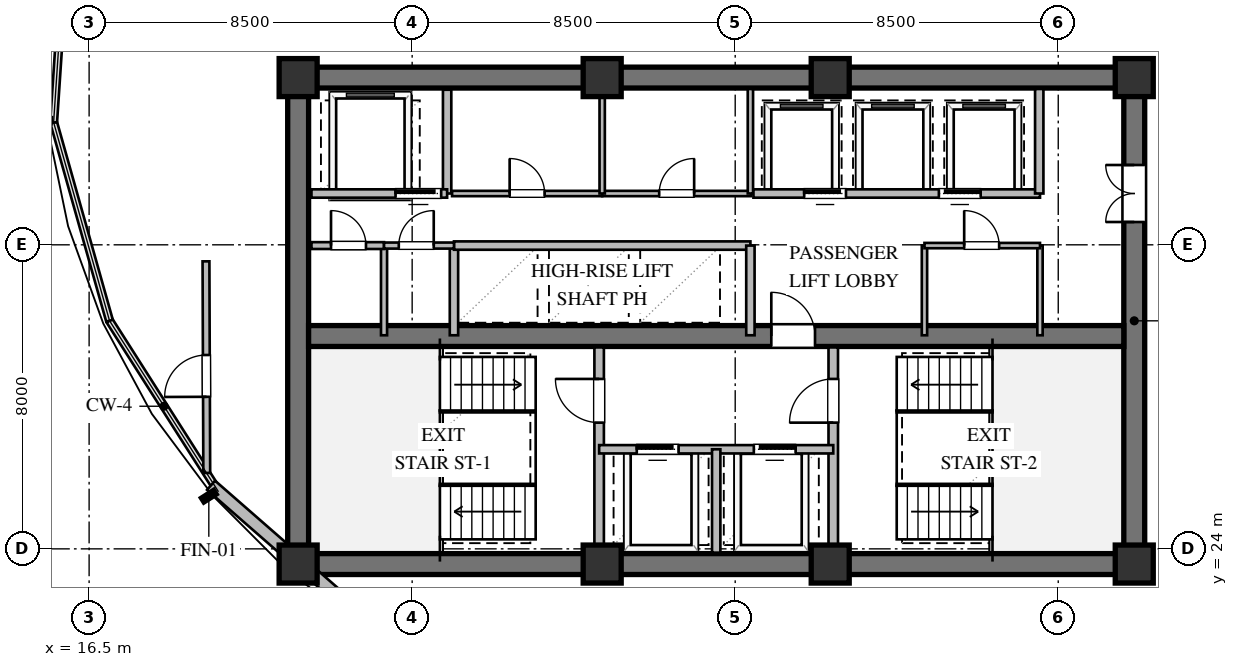
"""IFC4 building model, lengths in metres.
Left out: names, types, materials, properties, quantities, classifications, styles, units other than length and angle.
Written with IfcOpenShell. Run it as: python <this file> out.ifc"""

import sys

from ifc_helpers import new_model, si_unit, direction, frame, frame_2d, origin, origin_2d, place, context, subcontext, project, spatial, rectangle, extrude, element, fill, save


model = new_model("IFC4")
c1 = context("Model", 3, precision=1e-05, world=origin(), true_north=direction((0.0, 1.0)))
c2 = subcontext(c1, "Body", "Model", "MODEL_VIEW")
j1 = project(units=[si_unit("LENGTHUNIT", "METRE"), si_unit("PLANEANGLEUNIT", "RADIAN")], contexts=[c1])
p1 = place(None, origin())
s1 = spatial("IfcSite", under=j1, at=p1, CompositionType="ELEMENT")
p2 = place(p1, origin())
s2 = spatial("IfcBuilding", under=s1, at=p2, CompositionType="ELEMENT")
p3 = place(p2, frame((0.0, 0.0, 127.8)))
s3 = spatial("IfcBuildingStorey", under=s2, at=p3, CompositionType="ELEMENT", Elevation=127.8)
for number, where, z_axis, x_axis in (
    (1, (21.725, 23.6, 0.0), (0.0, 0.0, 1.0), (1.0, 0.0, 0.0)),
    (2, (21.725, 36.4, 0.0), (0.0, 0.0, 1.0), (1.0, 0.0, 0.0)),
):
    element("IfcWall", number, at=place(p3, frame(where, z_axis=z_axis, x_axis=x_axis)), inside=s3, PredefinedType="SHEAR", context=c2, shape_type="SweptSolid", body=[
        extrude(rectangle(XDim=22.55, YDim=0.55, at=frame_2d((11.275, 0.0))), origin(), (0.0, 0.0, 1.0), 3.36),
    ])
p4 = place(p3, frame((22.0, 23.875, 0.0), z_axis=(0.0, 0.0, 1.0), x_axis=(0.0, 1.0, 0.0)))
e3 = element("IfcWall", 3, at=p4, inside=s3, PredefinedType="SHEAR", context=c2, shape_type="SweptSolid", body=[
    extrude(rectangle(XDim=12.25, YDim=0.55, at=frame_2d((6.125, 0.0))), origin(), (0.0, 0.0, 1.0), 3.36),
])
p5 = place(p3, frame((44.0, 23.875, 0.0), z_axis=(0.0, 0.0, 1.0), x_axis=(0.0, 1.0, 0.0)))
e4 = element("IfcWall", 4, at=p5, inside=s3, PredefinedType="SHEAR", context=c2, shape_type="SweptSolid", body=[
    extrude(rectangle(XDim=12.25, YDim=0.55, at=frame_2d((6.125, 0.0))), origin(), (0.0, 0.0, 1.0), 3.36),
])
p6 = place(p5, frame((8.725, 0.0, 0.0)))
e5 = element("IfcOpeningElement", 5, at=p6, cuts=e4, PredefinedType="OPENING", context=c2, shape_type="SweptSolid", body=[
    extrude(rectangle(XDim=1.5, YDim=2.15, at=frame_2d((0.75, 1.075))), frame((0.0, 0.285, 0.0), z_axis=(0.0, -1.0, 0.0), x_axis=(1.0, 0.0, 0.0)), (0.0, 0.0, 1.0), 0.57),
])
p7 = place(p3, frame((22.275, 29.6, 0.0), z_axis=(0.0, 0.0, 1.0), x_axis=(1.0, 0.0, 0.0)))
e6 = element("IfcWall", 6, at=p7, inside=s3, PredefinedType="SHEAR", context=c2, shape_type="SweptSolid", body=[
    extrude(rectangle(XDim=21.45, YDim=0.55, at=frame_2d((10.725, 0.0))), origin(), (0.0, 0.0, 1.0), 3.36),
])
p8 = place(p7, frame((12.175, 0.0, 0.0)))
e7 = element("IfcOpeningElement", 7, at=p8, cuts=e6, PredefinedType="OPENING", context=c2, shape_type="SweptSolid", body=[
    extrude(rectangle(XDim=1.15, YDim=2.1, at=frame_2d((0.575, 1.05))), frame((0.0, 0.285, 0.0), z_axis=(0.0, -1.0, 0.0), x_axis=(1.0, 0.0, 0.0)), (0.0, 0.0, 1.0), 0.57),
])
for number, where, z_axis, x_axis in (
    (8, (22.0, 23.6, 0.0), (0.0, 0.0, 1.0), (1.0, 0.0, 0.0)),
    (9, (30.0, 23.6, 0.0), (0.0, 0.0, 1.0), (1.0, 0.0, 0.0)),
    (10, (36.0, 23.6, 0.0), (0.0, 0.0, 1.0), (1.0, 0.0, 0.0)),
    (11, (44.0, 23.6, 0.0), (0.0, 0.0, 1.0), (1.0, 0.0, 0.0)),
    (12, (44.0, 36.4, 0.0), (0.0, 0.0, 1.0), (1.0, 0.0, 0.0)),
    (13, (36.0, 36.4, 0.0), (0.0, 0.0, 1.0), (1.0, 0.0, 0.0)),
    (14, (30.0, 36.4, 0.0), (0.0, 0.0, 1.0), (1.0, 0.0, 0.0)),
    (15, (22.0, 36.4, 0.0), (0.0, 0.0, 1.0), (1.0, 0.0, 0.0)),
):
    element("IfcColumn", number, at=place(p3, frame(where, z_axis=z_axis, x_axis=x_axis)), inside=s3, PredefinedType="COLUMN", context=c2, shape_type="SweptSolid", body=[
        extrude(rectangle(XDim=1.0, YDim=1.0, at=origin_2d()), origin(), (0.0, 0.0, 1.0), 3.6),
    ])
p9 = place(p3, frame((24.225, 21.727, 0.0), z_axis=(0.0, 0.0, 1.0), x_axis=(-0.753105964003, 0.657899237713, 0.0)))
e16 = element("IfcWall", 16, at=p9, inside=s3, PredefinedType="STANDARD", context=c2, shape_type="SweptSolid", body=[
    extrude(rectangle(XDim=5.998, YDim=0.32, at=frame_2d((2.999, 0.0))), origin(), (0.0, 0.0, 1.0), 2.35),
])
p10 = place(p3, frame((29.92, 23.9, 0.0), z_axis=(0.0, 0.0, 1.0), x_axis=(0.0, 1.0, 0.0)))
e17 = element("IfcWall", 17, at=p10, inside=s3, PredefinedType="SOLIDWALL", context=c2, shape_type="SweptSolid", body=[
    extrude(rectangle(XDim=5.4, YDim=0.25, at=frame_2d((2.7, 0.0))), origin(), (0.0, 0.0, 1.0), 2.89),
])
p11 = place(p10, frame((3.421, 0.0, 0.0)))
e18 = element("IfcOpeningElement", 18, at=p11, cuts=e17, PredefinedType="OPENING", context=c2, shape_type="SweptSolid", body=[
    extrude(rectangle(XDim=1.15, YDim=2.1, at=frame_2d((0.575, 1.05))), frame((0.0, 0.135, 0.0), z_axis=(0.0, -1.0, 0.0), x_axis=(1.0, 0.0, 0.0)), (0.0, 0.0, 1.0), 0.27),
])
p12 = place(p3, frame((36.08, 23.9, 0.0), z_axis=(0.0, 0.0, 1.0), x_axis=(0.0, 1.0, 0.0)))
e19 = element("IfcWall", 19, at=p12, inside=s3, PredefinedType="SOLIDWALL", context=c2, shape_type="SweptSolid", body=[
    extrude(rectangle(XDim=5.4, YDim=0.25, at=frame_2d((2.7, 0.0))), origin(), (0.0, 0.0, 1.0), 3.36),
])
p13 = place(p12, frame((3.421, 0.0, 0.0)))
e20 = element("IfcOpeningElement", 20, at=p13, cuts=e19, PredefinedType="OPENING", context=c2, shape_type="SweptSolid", body=[
    extrude(rectangle(XDim=1.15, YDim=2.1, at=frame_2d((0.575, 1.05))), frame((0.0, 0.135, 0.0), z_axis=(0.0, -1.0, 0.0), x_axis=(1.0, 0.0, 0.0)), (0.0, 0.0, 1.0), 0.27),
])
p14 = place(p3, frame((29.92, 26.62, 0.0), z_axis=(0.0, 0.0, 1.0), x_axis=(1.0, 0.0, 0.0)))
e21 = element("IfcWall", 21, at=p14, inside=s3, PredefinedType="SOLIDWALL", context=c2, shape_type="SweptSolid", body=[
    extrude(rectangle(XDim=6.16, YDim=0.22, at=frame_2d((3.08, 0.0))), origin(), (0.0, 0.0, 1.0), 3.36),
])
p15 = place(p14, frame((0.99, 0.0, 0.0)))
e22 = element("IfcOpeningElement", 22, at=p15, cuts=e21, PredefinedType="OPENING", context=c2, shape_type="SweptSolid", body=[
    extrude(rectangle(XDim=1.1, YDim=2.1, at=frame_2d((0.55, 1.05))), frame((0.0, 0.12, 0.0), z_axis=(0.0, -1.0, 0.0), x_axis=(1.0, 0.0, 0.0)), (0.0, 0.0, 1.0), 0.24),
])
p16 = place(p14, frame((4.07, 0.0, 0.0)))
e23 = element("IfcOpeningElement", 23, at=p16, cuts=e21, PredefinedType="OPENING", context=c2, shape_type="SweptSolid", body=[
    extrude(rectangle(XDim=1.1, YDim=2.1, at=frame_2d((0.55, 1.05))), frame((0.0, 0.12, 0.0), z_axis=(0.0, -1.0, 0.0), x_axis=(1.0, 0.0, 0.0)), (0.0, 0.0, 1.0), 0.24),
])
p17 = place(p3, frame((33.0, 23.9, 0.0), z_axis=(0.0, 0.0, 1.0), x_axis=(0.0, 1.0, 0.0)))
e24 = element("IfcWall", 24, at=p17, inside=s3, PredefinedType="SOLIDWALL", context=c2, shape_type="SweptSolid", body=[
    extrude(rectangle(XDim=2.72, YDim=0.22, at=frame_2d((1.36, 0.0))), origin(), (0.0, 0.0, 1.0), 3.36),
])
p18 = place(p3, frame((25.92, 33.35, 0.0), z_axis=(0.0, 0.0, 1.0), x_axis=(0.0, 1.0, 0.0)))
e25 = element("IfcWall", 25, at=p18, inside=s3, PredefinedType="SOLIDWALL", context=c2, shape_type="SweptSolid", body=[
    extrude(rectangle(XDim=2.73, YDim=0.22, at=frame_2d((1.365, 0.0))), origin(), (0.0, 0.0, 1.0), 3.36),
])
p19 = place(p3, frame((22.35, 33.35, 0.0), z_axis=(0.0, 0.0, 1.0), x_axis=(1.0, 0.0, 0.0)))
e26 = element("IfcWall", 26, at=p19, inside=s3, PredefinedType="SOLIDWALL", context=c2, shape_type="SweptSolid", body=[
    extrude(rectangle(XDim=3.57, YDim=0.22, at=frame_2d((1.785, 0.0))), origin(), (0.0, 0.0, 1.0), 3.36),
])
p20 = place(p19, frame((2.213, 0.0, 0.0)))
e27 = element("IfcOpeningElement", 27, at=p20, cuts=e26, PredefinedType="OPENING", context=c2, shape_type="SweptSolid", body=[
    extrude(rectangle(XDim=1.2, YDim=2.1, at=frame_2d((0.6, 1.05))), frame((0.0, 0.12, 0.0), z_axis=(0.0, -1.0, 0.0), x_axis=(1.0, 0.0, 0.0)), (0.0, 0.0, 1.0), 0.24),
])
p21 = place(p3, frame((26.1, 29.62, 0.0), z_axis=(0.0, 0.0, 1.0), x_axis=(0.0, 1.0, 0.0)))
e28 = element("IfcWall", 28, at=p21, inside=s3, PredefinedType="SOLIDWALL", context=c2, shape_type="SweptSolid", body=[
    extrude(rectangle(XDim=2.36, YDim=0.22, at=frame_2d((1.18, 0.0))), origin(), (0.0, 0.0, 1.0), 3.36),
])
p22 = place(p3, frame((26.1, 31.98, 0.0), z_axis=(0.0, 0.0, 1.0), x_axis=(1.0, 0.0, 0.0)))
e29 = element("IfcWall", 29, at=p22, inside=s3, PredefinedType="SOLIDWALL", context=c2, shape_type="SweptSolid", body=[
    extrude(rectangle(XDim=7.8, YDim=0.22, at=frame_2d((3.9, 0.0))), origin(), (0.0, 0.0, 1.0), 3.36),
])
p23 = place(p3, frame((33.9, 29.62, 0.0), z_axis=(0.0, 0.0, 1.0), x_axis=(0.0, 1.0, 0.0)))
e30 = element("IfcWall", 30, at=p23, inside=s3, PredefinedType="SOLIDWALL", context=c2, shape_type="SweptSolid", body=[
    extrude(rectangle(XDim=2.36, YDim=0.22, at=frame_2d((1.18, 0.0))), origin(), (0.0, 0.0, 1.0), 3.36),
])
p24 = place(p3, frame((26.05, 33.35, 0.0), z_axis=(0.0, 0.0, 1.0), x_axis=(1.0, 0.0, 0.0)))
e31 = element("IfcWall", 31, at=p24, inside=s3, PredefinedType="PARTITIONING", context=c2, shape_type="SweptSolid", body=[
    extrude(rectangle(XDim=3.95, YDim=0.14, at=frame_2d((1.975, 0.0))), origin(), (0.0, 0.0, 1.0), 3.36),
])
p25 = place(p24, frame((1.515, 0.0, 0.0)))
e32 = element("IfcOpeningElement", 32, at=p25, cuts=e31, PredefinedType="OPENING", context=c2, shape_type="SweptSolid", body=[
    extrude(rectangle(XDim=0.92, YDim=2.1, at=frame_2d((0.46, 1.05))), frame((0.0, 0.08, 0.0), z_axis=(0.0, -1.0, 0.0), x_axis=(1.0, 0.0, 0.0)), (0.0, 0.0, 1.0), 0.16),
])
p26 = place(p3, frame((30.0, 33.35, 0.0), z_axis=(0.0, 0.0, 1.0), x_axis=(1.0, 0.0, 0.0)))
e33 = element("IfcWall", 33, at=p26, inside=s3, PredefinedType="PARTITIONING", context=c2, shape_type="SweptSolid", body=[
    extrude(rectangle(XDim=3.92, YDim=0.14, at=frame_2d((1.96, 0.0))), origin(), (0.0, 0.0, 1.0), 3.36),
])
p27 = place(p26, frame((1.5, 0.0, 0.0)))
e34 = element("IfcOpeningElement", 34, at=p27, cuts=e33, PredefinedType="OPENING", context=c2, shape_type="SweptSolid", body=[
    extrude(rectangle(XDim=0.92, YDim=2.1, at=frame_2d((0.46, 1.05))), frame((0.0, 0.08, 0.0), z_axis=(0.0, -1.0, 0.0), x_axis=(1.0, 0.0, 0.0)), (0.0, 0.0, 1.0), 0.16),
])
for number, where, z_axis, x_axis in (
    (35, (30.0, 33.35, 0.0), (0.0, 0.0, 1.0), (0.0, 1.0, 0.0)),
    (36, (33.9, 33.35, 0.0), (0.0, 0.0, 1.0), (0.0, 1.0, 0.0)),
):
    element("IfcWall", number, at=place(p3, frame(where, z_axis=z_axis, x_axis=x_axis)), inside=s3, PredefinedType="PARTITIONING", context=c2, shape_type="SweptSolid", body=[
        extrude(rectangle(XDim=2.75, YDim=0.14, at=frame_2d((1.375, 0.0))), origin(), (0.0, 0.0, 1.0), 3.36),
    ])
p28 = place(p3, frame((33.98, 33.35, 0.0), z_axis=(0.0, 0.0, 1.0), x_axis=(1.0, 0.0, 0.0)))
e37 = element("IfcWall", 37, at=p28, inside=s3, PredefinedType="SOLIDWALL", context=c2, shape_type="SweptSolid", body=[
    extrude(rectangle(XDim=7.54, YDim=0.22, at=frame_2d((3.77, 0.0))), origin(), (0.0, 0.0, 1.0), 3.36),
])
p29 = place(p28, frame((1.335, 0.0, 0.0)))
e38 = element("IfcOpeningElement", 38, at=p29, cuts=e37, PredefinedType="OPENING", context=c2, shape_type="SweptSolid", body=[
    extrude(rectangle(XDim=1.1, YDim=2.1, at=frame_2d((0.55, 1.05))), frame((0.0, 0.12, 0.0), z_axis=(0.0, -1.0, 0.0), x_axis=(1.0, 0.0, 0.0)), (0.0, 0.0, 1.0), 0.24),
])
p30 = place(p28, frame((4.879, 0.0, 0.0)))
e39 = element("IfcOpeningElement", 39, at=p30, cuts=e37, PredefinedType="OPENING", context=c2, shape_type="SweptSolid", body=[
    extrude(rectangle(XDim=1.1, YDim=2.1, at=frame_2d((0.55, 1.05))), frame((0.0, 0.12, 0.0), z_axis=(0.0, -1.0, 0.0), x_axis=(1.0, 0.0, 0.0)), (0.0, 0.0, 1.0), 0.24),
])
p31 = place(p3, frame((41.5, 33.35, 0.0), z_axis=(0.0, 0.0, 1.0), x_axis=(0.0, 1.0, 0.0)))
e40 = element("IfcWall", 40, at=p31, inside=s3, PredefinedType="SOLIDWALL", context=c2, shape_type="SweptSolid", body=[
    extrude(rectangle(XDim=2.75, YDim=0.22, at=frame_2d((1.375, 0.0))), origin(), (0.0, 0.0, 1.0), 3.36),
])
p32 = place(p3, frame((24.26, 29.62, 0.0), z_axis=(0.0, 0.0, 1.0), x_axis=(0.0, 1.0, 0.0)))
e41 = element("IfcWall", 41, at=p32, inside=s3, PredefinedType="PLUMBINGWALL", context=c2, shape_type="SweptSolid", body=[
    extrude(rectangle(XDim=2.36, YDim=0.16, at=frame_2d((1.18, 0.0))), origin(), (0.0, 0.0, 1.0), 3.36),
])
p33 = place(p3, frame((22.35, 31.98, 0.0), z_axis=(0.0, 0.0, 1.0), x_axis=(1.0, 0.0, 0.0)))
e42 = element("IfcWall", 42, at=p33, inside=s3, PredefinedType="PARTITIONING", context=c2, shape_type="SweptSolid", body=[
    extrude(rectangle(XDim=1.91, YDim=0.18, at=frame_2d((0.955, 0.0))), origin(), (0.0, 0.0, 1.0), 3.36),
])
p34 = place(p33, frame((0.515, 0.0, 0.0)))
e43 = element("IfcOpeningElement", 43, at=p34, cuts=e42, PredefinedType="OPENING", context=c2, shape_type="SweptSolid", body=[
    extrude(rectangle(XDim=0.92, YDim=2.1, at=frame_2d((0.46, 1.05))), frame((0.0, 0.1, 0.0), z_axis=(0.0, -1.0, 0.0), x_axis=(1.0, 0.0, 0.0)), (0.0, 0.0, 1.0), 0.2),
])
p35 = place(p3, frame((24.26, 31.98, 0.0), z_axis=(0.0, 0.0, 1.0), x_axis=(1.0, 0.0, 0.0)))
e44 = element("IfcWall", 44, at=p35, inside=s3, PredefinedType="PLUMBINGWALL", context=c2, shape_type="SweptSolid", body=[
    extrude(rectangle(XDim=1.84, YDim=0.16, at=frame_2d((0.92, 0.0))), origin(), (0.0, 0.0, 1.0), 3.36),
])
p36 = place(p35, frame((0.388, 0.0, 0.0)))
e45 = element("IfcOpeningElement", 45, at=p36, cuts=e44, PredefinedType="OPENING", context=c2, shape_type="SweptSolid", body=[
    extrude(rectangle(XDim=0.92, YDim=2.1, at=frame_2d((0.46, 1.05))), frame((0.0, 0.09, 0.0), z_axis=(0.0, -1.0, 0.0), x_axis=(1.0, 0.0, 0.0)), (0.0, 0.0, 1.0), 0.18),
])
for number, where, z_axis, x_axis in (
    (46, (38.48, 29.62, 0.0), (0.0, 0.0, 1.0), (0.0, 1.0, 0.0)),
    (47, (41.52, 29.62, 0.0), (0.0, 0.0, 1.0), (0.0, 1.0, 0.0)),
):
    element("IfcWall", number, at=place(p3, frame(where, z_axis=z_axis, x_axis=x_axis)), inside=s3, PredefinedType="PARTITIONING", context=c2, shape_type="SweptSolid", body=[
        extrude(rectangle(XDim=2.36, YDim=0.14, at=frame_2d((1.18, 0.0))), origin(), (0.0, 0.0, 1.0), 3.36),
    ])
p37 = place(p3, frame((38.48, 31.98, 0.0), z_axis=(0.0, 0.0, 1.0), x_axis=(1.0, 0.0, 0.0)))
e48 = element("IfcWall", 48, at=p37, inside=s3, PredefinedType="PARTITIONING", context=c2, shape_type="SweptSolid", body=[
    extrude(rectangle(XDim=3.04, YDim=0.14, at=frame_2d((1.52, 0.0))), origin(), (0.0, 0.0, 1.0), 3.36),
])
p38 = place(p37, frame((1.045, 0.0, 0.0)))
e49 = element("IfcOpeningElement", 49, at=p38, cuts=e48, PredefinedType="OPENING", context=c2, shape_type="SweptSolid", body=[
    extrude(rectangle(XDim=0.92, YDim=2.1, at=frame_2d((0.46, 1.05))), frame((0.0, 0.08, 0.0), z_axis=(0.0, -1.0, 0.0), x_axis=(1.0, 0.0, 0.0)), (0.0, 0.0, 1.0), 0.16),
])
p39 = place(p3, frame((19.595, 25.997, 0.0), z_axis=(0.0, 0.0, 1.0), x_axis=(-0.003639049913, 0.999993378636, 0.0)))
e50 = element("IfcWall", 50, at=p39, inside=s3, PredefinedType="PARTITIONING", context=c2, shape_type="SweptSolid", body=[
    extrude(rectangle(XDim=5.568, YDim=0.18, at=frame_2d((2.784, 0.0))), origin(), (0.0, 0.0, 1.0), 2.657),
])
p40 = place(p39, frame((2.004, 0.0, 0.0)))
e51 = element("IfcOpeningElement", 51, at=p40, cuts=e50, PredefinedType="OPENING", context=c2, shape_type="SweptSolid", body=[
    extrude(rectangle(XDim=1.1, YDim=2.1, at=frame_2d((0.55, 1.05))), frame((0.0, 0.1, 0.0), z_axis=(0.0, -1.0, 0.0), x_axis=(1.0, 0.0, 0.0)), (0.0, 0.0, 1.0), 0.2),
])
p41 = place(p11, origin())
e52 = element("IfcDoor", 52, at=p41, inside=s3, OperationType="SINGLE_SWING_RIGHT", PredefinedType="DOOR", context=c2, shape_type="SweptSolid", body=[
    extrude(rectangle(XDim=1.15, YDim=2.1, at=frame_2d((0.575, 1.05))), frame((0.0, 0.025, 0.0), z_axis=(0.0, -1.0, 0.0), x_axis=(1.0, 0.0, 0.0)), (0.0, 0.0, 1.0), 0.05),
])
fill(e18, e52)
p42 = place(p13, origin())
e53 = element("IfcDoor", 53, at=p42, inside=s3, OperationType="SINGLE_SWING_LEFT", PredefinedType="DOOR", context=c2, shape_type="SweptSolid", body=[
    extrude(rectangle(XDim=1.15, YDim=2.1, at=frame_2d((0.575, 1.05))), frame((0.0, 0.025, 0.0), z_axis=(0.0, -1.0, 0.0), x_axis=(1.0, 0.0, 0.0)), (0.0, 0.0, 1.0), 0.05),
])
fill(e20, e53)
p43 = place(p15, origin())
e54 = element("IfcDoor", 54, at=p43, inside=s3, OperationType="SLIDING_TO_LEFT", PredefinedType="DOOR", context=c2, shape_type="SweptSolid", body=[
    extrude(rectangle(XDim=1.1, YDim=2.1, at=frame_2d((0.55, 1.05))), frame((0.0, 0.025, 0.0), z_axis=(0.0, -1.0, 0.0), x_axis=(1.0, 0.0, 0.0)), (0.0, 0.0, 1.0), 0.05),
])
fill(e22, e54)
p44 = place(p16, origin())
e55 = element("IfcDoor", 55, at=p44, inside=s3, OperationType="SLIDING_TO_RIGHT", PredefinedType="DOOR", context=c2, shape_type="SweptSolid", body=[
    extrude(rectangle(XDim=1.1, YDim=2.1, at=frame_2d((0.55, 1.05))), frame((0.0, 0.025, 0.0), z_axis=(0.0, -1.0, 0.0), x_axis=(1.0, 0.0, 0.0)), (0.0, 0.0, 1.0), 0.05),
])
fill(e23, e55)
p45 = place(p8, origin())
e56 = element("IfcDoor", 56, at=p45, inside=s3, OperationType="SINGLE_SWING_LEFT", PredefinedType="DOOR", context=c2, shape_type="SweptSolid", body=[
    extrude(rectangle(XDim=1.15, YDim=2.1, at=frame_2d((0.575, 1.05))), frame((0.0, 0.025, 0.0), z_axis=(0.0, -1.0, 0.0), x_axis=(1.0, 0.0, 0.0)), (0.0, 0.0, 1.0), 0.05),
])
fill(e7, e56)
p46 = place(p6, origin())
e57 = element("IfcDoor", 57, at=p46, inside=s3, OperationType="DOUBLE_DOOR_SINGLE_SWING", PredefinedType="DOOR", context=c2, shape_type="SweptSolid", body=[
    extrude(rectangle(XDim=1.5, YDim=2.15, at=frame_2d((0.75, 1.075))), frame((0.0, 0.025, 0.0), z_axis=(0.0, -1.0, 0.0), x_axis=(1.0, 0.0, 0.0)), (0.0, 0.0, 1.0), 0.05),
])
fill(e5, e57)
p47 = place(p20, origin())
e58 = element("IfcDoor", 58, at=p47, inside=s3, OperationType="SLIDING_TO_LEFT", PredefinedType="DOOR", context=c2, shape_type="SweptSolid", body=[
    extrude(rectangle(XDim=1.2, YDim=2.1, at=frame_2d((0.6, 1.05))), frame((0.0, 0.025, 0.0), z_axis=(0.0, -1.0, 0.0), x_axis=(1.0, 0.0, 0.0)), (0.0, 0.0, 1.0), 0.05),
])
fill(e27, e58)
p48 = place(p25, origin())
e59 = element("IfcDoor", 59, at=p48, inside=s3, OperationType="SINGLE_SWING_LEFT", PredefinedType="DOOR", context=c2, shape_type="SweptSolid", body=[
    extrude(rectangle(XDim=0.92, YDim=2.1, at=frame_2d((0.46, 1.05))), frame((0.0, 0.025, 0.0), z_axis=(0.0, -1.0, 0.0), x_axis=(1.0, 0.0, 0.0)), (0.0, 0.0, 1.0), 0.05),
])
fill(e32, e59)
p49 = place(p27, origin())
e60 = element("IfcDoor", 60, at=p49, inside=s3, OperationType="SINGLE_SWING_RIGHT", PredefinedType="DOOR", context=c2, shape_type="SweptSolid", body=[
    extrude(rectangle(XDim=0.92, YDim=2.1, at=frame_2d((0.46, 1.05))), frame((0.0, 0.025, 0.0), z_axis=(0.0, -1.0, 0.0), x_axis=(1.0, 0.0, 0.0)), (0.0, 0.0, 1.0), 0.05),
])
fill(e34, e60)
p50 = place(p29, origin())
e61 = element("IfcDoor", 61, at=p50, inside=s3, OperationType="SLIDING_TO_LEFT", PredefinedType="DOOR", context=c2, shape_type="SweptSolid", body=[
    extrude(rectangle(XDim=1.1, YDim=2.1, at=frame_2d((0.55, 1.05))), frame((0.0, 0.025, 0.0), z_axis=(0.0, -1.0, 0.0), x_axis=(1.0, 0.0, 0.0)), (0.0, 0.0, 1.0), 0.05),
])
fill(e38, e61)
p51 = place(p30, origin())
e62 = element("IfcDoor", 62, at=p51, inside=s3, OperationType="SLIDING_TO_RIGHT", PredefinedType="DOOR", context=c2, shape_type="SweptSolid", body=[
    extrude(rectangle(XDim=1.1, YDim=2.1, at=frame_2d((0.55, 1.05))), frame((0.0, 0.025, 0.0), z_axis=(0.0, -1.0, 0.0), x_axis=(1.0, 0.0, 0.0)), (0.0, 0.0, 1.0), 0.05),
])
fill(e39, e62)
p52 = place(p34, origin())
e63 = element("IfcDoor", 63, at=p52, inside=s3, OperationType="SINGLE_SWING_LEFT", PredefinedType="DOOR", context=c2, shape_type="SweptSolid", body=[
    extrude(rectangle(XDim=0.92, YDim=2.1, at=frame_2d((0.46, 1.05))), frame((0.0, 0.025, 0.0), z_axis=(0.0, -1.0, 0.0), x_axis=(1.0, 0.0, 0.0)), (0.0, 0.0, 1.0), 0.05),
])
fill(e43, e63)
p53 = place(p36, origin())
e64 = element("IfcDoor", 64, at=p53, inside=s3, OperationType="SINGLE_SWING_RIGHT", PredefinedType="DOOR", context=c2, shape_type="SweptSolid", body=[
    extrude(rectangle(XDim=0.92, YDim=2.1, at=frame_2d((0.46, 1.05))), frame((0.0, 0.025, 0.0), z_axis=(0.0, -1.0, 0.0), x_axis=(1.0, 0.0, 0.0)), (0.0, 0.0, 1.0), 0.05),
])
fill(e45, e64)
p54 = place(p38, origin())
e65 = element("IfcDoor", 65, at=p54, inside=s3, OperationType="SINGLE_SWING_LEFT", PredefinedType="DOOR", context=c2, shape_type="SweptSolid", body=[
    extrude(rectangle(XDim=0.92, YDim=2.1, at=frame_2d((0.46, 1.05))), frame((0.0, 0.025, 0.0), z_axis=(0.0, -1.0, 0.0), x_axis=(1.0, 0.0, 0.0)), (0.0, 0.0, 1.0), 0.05),
])
fill(e49, e65)
p55 = place(p40, origin())
e66 = element("IfcDoor", 66, at=p55, inside=s3, OperationType="SINGLE_SWING_LEFT", PredefinedType="DOOR", context=c2, shape_type="SweptSolid", body=[
    extrude(rectangle(XDim=1.1, YDim=2.1, at=frame_2d((0.55, 1.05))), frame((0.0, 0.025, 0.0), z_axis=(0.0, -1.0, 0.0), x_axis=(1.0, 0.0, 0.0)), (0.0, 0.0, 1.0), 0.05),
])
fill(e51, e66)
save(model, sys.argv[1])
